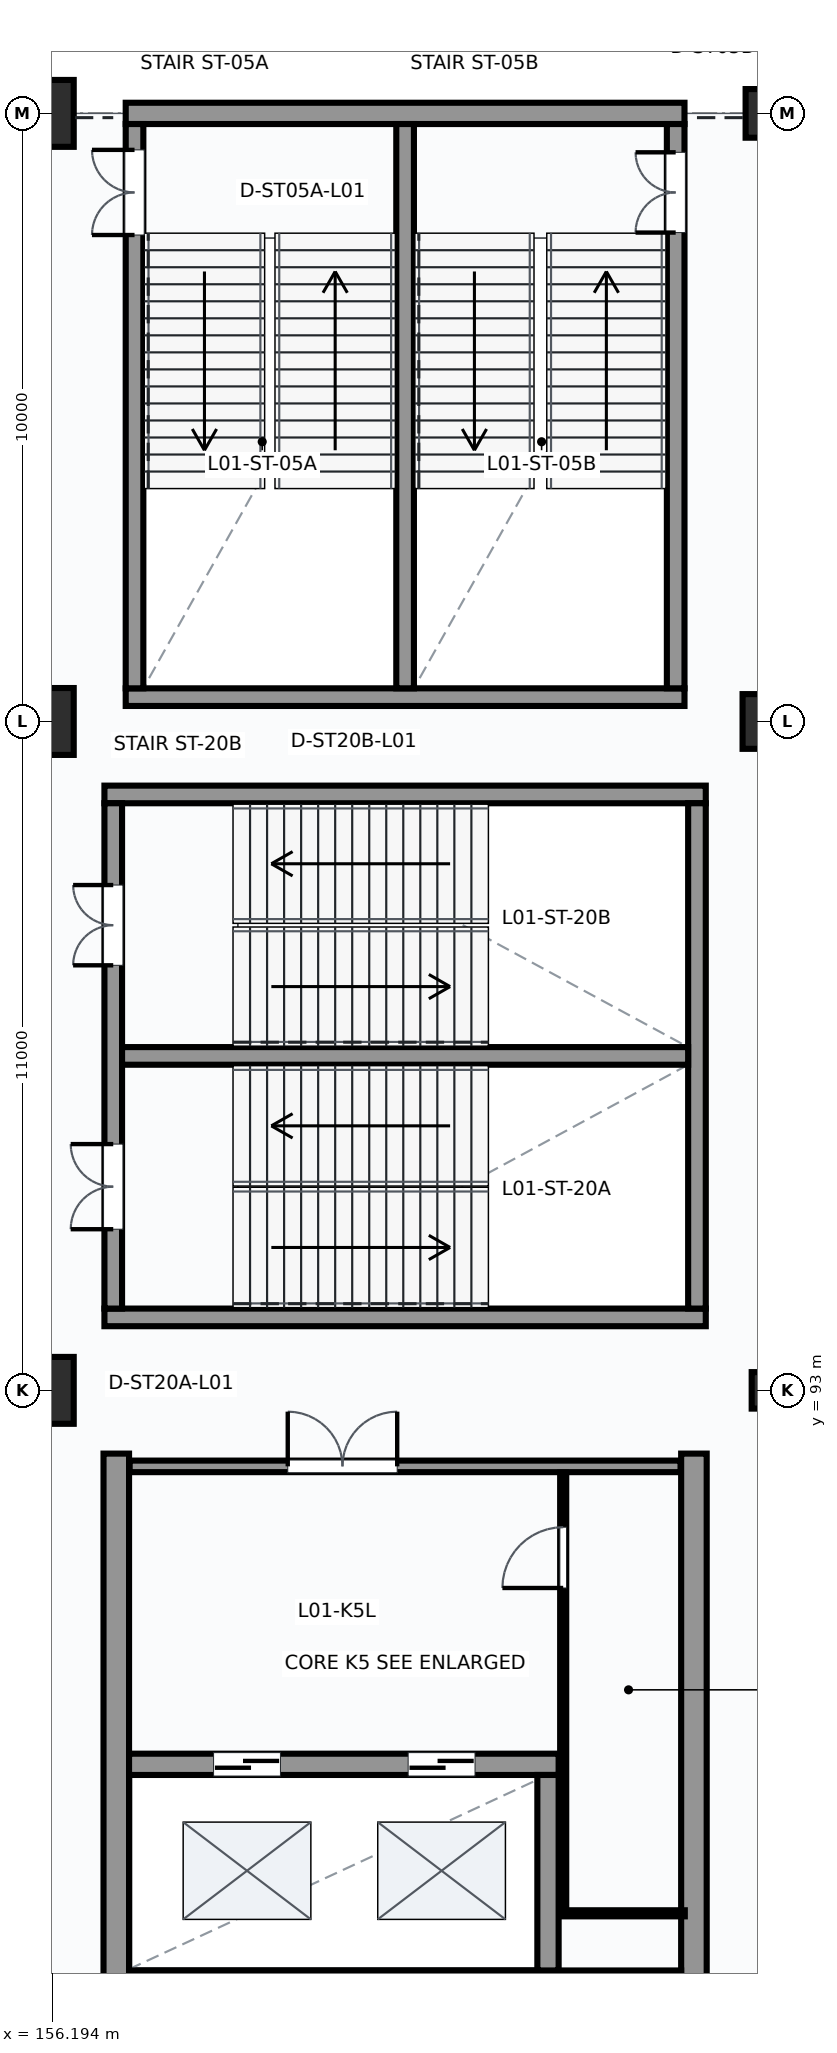
"""IFC4 building model, lengths in metres.
Left out: names, types, materials, properties, quantities, classifications, styles, units other than length and angle.
Written with IfcOpenShell. Run it as: python <this file> out.ifc"""

import sys

from ifc_helpers import new_model, si_unit, direction, frame, frame_2d, origin, origin_2d, place, context, subcontext, project, spatial, rectangle, circle, extrude, element, fill, save


model = new_model("IFC4")
c1 = context("Model", 3, precision=1e-05, world=origin(), true_north=direction((0.0, 1.0)))
c2 = subcontext(c1, "Body", "Model", "MODEL_VIEW")
j1 = project(units=[si_unit("LENGTHUNIT", "METRE"), si_unit("PLANEANGLEUNIT", "RADIAN")], contexts=[c1])
p1 = place(None, origin())
s1 = spatial("IfcSite", under=j1, at=p1, CompositionType="ELEMENT")
p2 = place(p1, origin())
s2 = spatial("IfcBuilding", under=s1, at=p2, CompositionType="ELEMENT")
p3 = place(p2, frame((0.0, 0.0, 5.4)))
s3 = spatial("IfcBuildingStorey", under=s2, at=p3, CompositionType="ELEMENT", Elevation=5.4)
for number, where, z_axis, x_axis in (
    (1, (156.0, 93.0, 0.0), (0.0, 0.0, 1.0), (1.0, 0.0, 0.0)),
    (2, (156.0, 104.0, 0.0), (0.0, 0.0, 1.0), (1.0, 0.0, 0.0)),
    (3, (156.0, 114.0, 0.0), (0.0, 0.0, 1.0), (1.0, 0.0, 0.0)),
):
    element("IfcColumn", number, at=place(p3, frame(where, z_axis=z_axis, x_axis=x_axis)), inside=s3, PredefinedType="COLUMN", context=c2, shape_type="SweptSolid", body=[
        extrude(rectangle(XDim=1.1, YDim=1.1, at=origin_2d()), origin(), (0.0, 0.0, 1.0), 4.8),
    ])
p4 = place(p3, frame((168.0, 93.0, 0.0), z_axis=(0.0, 0.0, 1.0), x_axis=(1.0, 0.0, 0.0)))
e4 = element("IfcColumn", 4, at=p4, inside=s3, PredefinedType="COLUMN", context=c2, shape_type="SweptSolid", body=[
    extrude(rectangle(XDim=0.6, YDim=0.6, at=origin_2d()), origin(), (0.0, 0.0, 1.0), 4.8),
])
p5 = place(p3, frame((168.0, 104.0, 0.0), z_axis=(0.0, 0.0, 1.0), x_axis=(1.0, 0.0, 0.0)))
e5 = element("IfcColumn", 5, at=p5, inside=s3, PredefinedType="COLUMN", context=c2, shape_type="SweptSolid", body=[
    extrude(circle(Radius=0.45, at=origin_2d()), origin(), (0.0, 0.0, 1.0), 4.8),
])
p6 = place(p3, frame((168.0, 114.0, 0.0), z_axis=(0.0, 0.0, 1.0), x_axis=(1.0, 0.0, 0.0)))
e6 = element("IfcColumn", 6, at=p6, inside=s3, PredefinedType="COLUMN", context=c2, shape_type="SweptSolid", body=[
    extrude(circle(Radius=0.4, at=origin_2d()), origin(), (0.0, 0.0, 1.0), 4.8),
])
p7 = place(p3, frame((157.405, 104.4, 0.0), z_axis=(0.0, 0.0, 1.0), x_axis=(1.0, 0.0, 0.0)))
e7 = element("IfcWall", 7, at=p7, inside=s3, PredefinedType="SHEAR", context=c2, shape_type="SweptSolid", body=[
    extrude(rectangle(XDim=9.19, YDim=0.29, at=frame_2d((4.595, 0.0))), origin(), (0.0, 0.0, 1.0), 4.8),
])
p8 = place(p3, frame((157.405, 114.0, 0.0), z_axis=(0.0, 0.0, 1.0), x_axis=(1.0, 0.0, 0.0)))
e8 = element("IfcWall", 8, at=p8, inside=s3, PredefinedType="SHEAR", context=c2, shape_type="SweptSolid", body=[
    extrude(rectangle(XDim=9.19, YDim=0.35, at=frame_2d((4.595, 0.0))), origin(), (0.0, 0.0, 1.0), 3.757),
])
p9 = place(p3, frame((157.55, 104.545, 0.0), z_axis=(0.0, 0.0, 1.0), x_axis=(0.0, 1.0, 0.0)))
e9 = element("IfcWall", 9, at=p9, inside=s3, PredefinedType="SHEAR", context=c2, shape_type="SweptSolid", body=[
    extrude(rectangle(XDim=9.28, YDim=0.29, at=frame_2d((4.64, 0.0))), origin(), (0.0, 0.0, 1.0), 4.8),
])
p10 = place(p9, frame((7.455, 0.0, 0.0)))
e10 = element("IfcOpeningElement", 10, at=p10, cuts=e9, PredefinedType="OPENING", context=c2, shape_type="SweptSolid", body=[
    extrude(rectangle(XDim=1.4, YDim=2.2, at=frame_2d((0.7, 1.1))), frame((0.0, 0.155, 0.0), z_axis=(0.0, -1.0, 0.0), x_axis=(1.0, 0.0, 0.0)), (0.0, 0.0, 1.0), 0.31),
])
p11 = place(p3, frame((166.45, 104.545, 0.0), z_axis=(0.0, 0.0, 1.0), x_axis=(0.0, 1.0, 0.0)))
e11 = element("IfcWall", 11, at=p11, inside=s3, PredefinedType="SHEAR", context=c2, shape_type="SweptSolid", body=[
    extrude(rectangle(XDim=9.28, YDim=0.29, at=frame_2d((4.64, 0.0))), origin(), (0.0, 0.0, 1.0), 4.8),
])
p12 = place(p11, frame((7.495, 0.0, 0.0)))
e12 = element("IfcOpeningElement", 12, at=p12, cuts=e11, PredefinedType="OPENING", context=c2, shape_type="SweptSolid", body=[
    extrude(rectangle(XDim=1.32, YDim=2.2, at=frame_2d((0.66, 1.1))), frame((0.0, 0.155, 0.0), z_axis=(0.0, -1.0, 0.0), x_axis=(1.0, 0.0, 0.0)), (0.0, 0.0, 1.0), 0.31),
])
p13 = place(p3, frame((162.0, 104.545, 0.0), z_axis=(0.0, 0.0, 1.0), x_axis=(0.0, 1.0, 0.0)))
e13 = element("IfcWall", 13, at=p13, inside=s3, PredefinedType="SHEAR", context=c2, shape_type="SweptSolid", body=[
    extrude(rectangle(XDim=9.28, YDim=0.29, at=frame_2d((4.64, 0.0))), origin(), (0.0, 0.0, 1.0), 4.8),
])
for number, where, z_axis, x_axis in (
    (14, (157.055, 94.2, 0.0), (0.0, 0.0, 1.0), (1.0, 0.0, 0.0)),
    (15, (157.055, 102.8, 0.0), (0.0, 0.0, 1.0), (1.0, 0.0, 0.0)),
):
    element("IfcWall", number, at=place(p3, frame(where, z_axis=z_axis, x_axis=x_axis)), inside=s3, PredefinedType="SHEAR", context=c2, shape_type="SweptSolid", body=[
        extrude(rectangle(XDim=9.89, YDim=0.29, at=frame_2d((4.945, 0.0))), origin(), (0.0, 0.0, 1.0), 4.8),
    ])
p14 = place(p3, frame((157.2, 94.345, 0.0), z_axis=(0.0, 0.0, 1.0), x_axis=(0.0, 1.0, 0.0)))
e16 = element("IfcWall", 16, at=p14, inside=s3, PredefinedType="SHEAR", context=c2, shape_type="SweptSolid", body=[
    extrude(rectangle(XDim=8.31, YDim=0.29, at=frame_2d((4.155, 0.0))), origin(), (0.0, 0.0, 1.0), 4.8),
])
p15 = place(p14, frame((1.305, 0.0, 0.0)))
e17 = element("IfcOpeningElement", 17, at=p15, cuts=e16, PredefinedType="OPENING", context=c2, shape_type="SweptSolid", body=[
    extrude(rectangle(XDim=1.4, YDim=2.2, at=frame_2d((0.7, 1.1))), frame((0.0, 0.155, 0.0), z_axis=(0.0, -1.0, 0.0), x_axis=(1.0, 0.0, 0.0)), (0.0, 0.0, 1.0), 0.31),
])
p16 = place(p14, frame((5.645, 0.0, 0.0)))
e18 = element("IfcOpeningElement", 18, at=p16, cuts=e16, PredefinedType="OPENING", context=c2, shape_type="SweptSolid", body=[
    extrude(rectangle(XDim=1.32, YDim=2.2, at=frame_2d((0.66, 1.1))), frame((0.0, 0.155, 0.0), z_axis=(0.0, -1.0, 0.0), x_axis=(1.0, 0.0, 0.0)), (0.0, 0.0, 1.0), 0.31),
])
p17 = place(p3, frame((166.8, 94.345, 0.0), z_axis=(0.0, 0.0, 1.0), x_axis=(0.0, 1.0, 0.0)))
e19 = element("IfcWall", 19, at=p17, inside=s3, PredefinedType="SHEAR", context=c2, shape_type="SweptSolid", body=[
    extrude(rectangle(XDim=8.31, YDim=0.29, at=frame_2d((4.155, 0.0))), origin(), (0.0, 0.0, 1.0), 4.8),
])
p18 = place(p3, frame((157.345, 98.5, 0.0), z_axis=(0.0, 0.0, 1.0), x_axis=(1.0, 0.0, 0.0)))
e20 = element("IfcWall", 20, at=p18, inside=s3, PredefinedType="SHEAR", context=c2, shape_type="SweptSolid", body=[
    extrude(rectangle(XDim=9.31, YDim=0.29, at=frame_2d((4.655, 0.0))), origin(), (0.0, 0.0, 1.0), 4.8),
])
for number, where, z_axis, x_axis in (
    (21, (157.25, 83.04, 0.0), (0.0, 0.0, 1.0), (0.0, 1.0, 0.0)),
    (22, (166.75, 83.04, 0.0), (0.0, 0.0, 1.0), (0.0, 1.0, 0.0)),
):
    element("IfcWall", number, at=place(p3, frame(where, z_axis=z_axis, x_axis=x_axis)), inside=s3, PredefinedType="SHEAR", context=c2, shape_type="SweptSolid", body=[
        extrude(rectangle(XDim=8.92, YDim=0.42, at=frame_2d((4.46, 0.0))), origin(), (0.0, 0.0, 1.0), 4.8),
    ])
p19 = place(p3, frame((157.46, 83.25, 0.0), z_axis=(0.0, 0.0, 1.0), x_axis=(1.0, 0.0, 0.0)))
e23 = element("IfcWall", 23, at=p19, inside=s3, PredefinedType="SHEAR", context=c2, shape_type="SweptSolid", body=[
    extrude(rectangle(XDim=9.08, YDim=0.42, at=frame_2d((4.54, 0.0))), origin(), (0.0, 0.0, 1.0), 4.8),
])
p20 = place(p3, frame((157.46, 86.85, 0.0), z_axis=(0.0, 0.0, 1.0), x_axis=(1.0, 0.0, 0.0)))
e24 = element("IfcWall", 24, at=p20, inside=s3, PredefinedType="SHEAR", context=c2, shape_type="SweptSolid", body=[
    extrude(rectangle(XDim=7.065, YDim=0.35, at=frame_2d((3.532, 0.0))), origin(), (0.0, 0.0, 1.0), 4.8),
])
p21 = place(p20, frame((1.39, 0.0, 0.0)))
e25 = element("IfcOpeningElement", 25, at=p21, cuts=e24, PredefinedType="OPENING", context=c2, shape_type="SweptSolid", body=[
    extrude(rectangle(XDim=1.1, YDim=2.2, at=frame_2d((0.55, 1.1))), frame((0.0, 0.185, 0.0), z_axis=(0.0, -1.0, 0.0), x_axis=(1.0, 0.0, 0.0)), (0.0, 0.0, 1.0), 0.37),
])
p22 = place(p20, frame((4.59, 0.0, 0.0)))
e26 = element("IfcOpeningElement", 26, at=p22, cuts=e24, PredefinedType="OPENING", context=c2, shape_type="SweptSolid", body=[
    extrude(rectangle(XDim=1.1, YDim=2.2, at=frame_2d((0.55, 1.1))), frame((0.0, 0.185, 0.0), z_axis=(0.0, -1.0, 0.0), x_axis=(1.0, 0.0, 0.0)), (0.0, 0.0, 1.0), 0.37),
])
p23 = place(p3, frame((164.35, 83.46, 0.0), z_axis=(0.0, 0.0, 1.0), x_axis=(0.0, 1.0, 0.0)))
e27 = element("IfcWall", 27, at=p23, inside=s3, PredefinedType="SHEAR", context=c2, shape_type="SweptSolid", body=[
    extrude(rectangle(XDim=3.215, YDim=0.35, at=frame_2d((1.607, 0.0))), origin(), (0.0, 0.0, 1.0), 4.8),
])
p24 = place(p3, frame((157.47, 91.75, 0.0), z_axis=(0.0, 0.0, 1.0), x_axis=(1.0, 0.0, 0.0)))
e28 = element("IfcWall", 28, at=p24, inside=s3, PredefinedType="PARTITIONING", context=c2, shape_type="SweptSolid", body=[
    extrude(rectangle(XDim=9.06, YDim=0.19, at=frame_2d((4.53, 0.0))), origin(), (0.0, 0.0, 1.0), 4.47),
])
p25 = place(p24, frame((2.6, 0.0, 0.0)))
e29 = element("IfcOpeningElement", 29, at=p25, cuts=e28, PredefinedType="OPENING", context=c2, shape_type="SweptSolid", body=[
    extrude(rectangle(XDim=1.8, YDim=2.3, at=frame_2d((0.9, 1.15))), frame((0.0, 0.105, 0.0), z_axis=(0.0, -1.0, 0.0), x_axis=(1.0, 0.0, 0.0)), (0.0, 0.0, 1.0), 0.21),
])
p26 = place(p3, frame((164.6, 84.4, 0.0), z_axis=(0.0, 0.0, 1.0), x_axis=(0.0, 1.0, 0.0)))
e30 = element("IfcWall", 30, at=p26, inside=s3, PredefinedType="PARTITIONING", context=c2, shape_type="SweptSolid", body=[
    extrude(rectangle(XDim=7.25, YDim=0.1, at=frame_2d((3.625, 0.0))), origin(), (0.0, 0.0, 1.0), 4.47),
])
p27 = place(p26, frame((5.35, 0.0, 0.0)))
e31 = element("IfcOpeningElement", 31, at=p27, cuts=e30, PredefinedType="OPENING", context=c2, shape_type="SweptSolid", body=[
    extrude(rectangle(XDim=1.0, YDim=2.1, at=frame_2d((0.5, 1.05))), frame((0.0, 0.06, 0.0), z_axis=(0.0, -1.0, 0.0), x_axis=(1.0, 0.0, 0.0)), (0.0, 0.0, 1.0), 0.12),
])
p28 = place(p3, frame((164.6, 84.4, 0.0), z_axis=(0.0, 0.0, 1.0), x_axis=(1.0, 0.0, 0.0)))
e32 = element("IfcWall", 32, at=p28, inside=s3, PredefinedType="PARTITIONING", context=c2, shape_type="SweptSolid", body=[
    extrude(rectangle(XDim=2.0, YDim=0.1, at=frame_2d((1.0, 0.0))), origin(), (0.0, 0.0, 1.0), 4.47),
])
p29 = place(p10, frame((1.4, 0.0, 0.0), z_axis=(0.0, 0.0, 1.0), x_axis=(-1.0, 0.0, 0.0)))
e33 = element("IfcDoor", 33, at=p29, inside=s3, OperationType="DOUBLE_DOOR_SINGLE_SWING", PredefinedType="DOOR", context=c2, shape_type="SweptSolid", body=[
    extrude(rectangle(XDim=1.4, YDim=2.2, at=frame_2d((0.7, 1.1))), frame((0.0, 0.025, 0.0), z_axis=(0.0, -1.0, 0.0), x_axis=(1.0, 0.0, 0.0)), (0.0, 0.0, 1.0), 0.05),
])
fill(e10, e33)
p30 = place(p12, origin())
e34 = element("IfcDoor", 34, at=p30, inside=s3, OperationType="DOUBLE_DOOR_SINGLE_SWING", PredefinedType="DOOR", context=c2, shape_type="SweptSolid", body=[
    extrude(rectangle(XDim=1.32, YDim=2.2, at=frame_2d((0.66, 1.1))), frame((0.0, 0.025, 0.0), z_axis=(0.0, -1.0, 0.0), x_axis=(1.0, 0.0, 0.0)), (0.0, 0.0, 1.0), 0.05),
])
fill(e12, e34)
p31 = place(p15, origin())
e35 = element("IfcDoor", 35, at=p31, inside=s3, OperationType="DOUBLE_DOOR_SINGLE_SWING", PredefinedType="DOOR", context=c2, shape_type="SweptSolid", body=[
    extrude(rectangle(XDim=1.4, YDim=2.2, at=frame_2d((0.7, 1.1))), frame((0.0, 0.025, 0.0), z_axis=(0.0, -1.0, 0.0), x_axis=(1.0, 0.0, 0.0)), (0.0, 0.0, 1.0), 0.05),
])
fill(e17, e35)
p32 = place(p16, origin())
e36 = element("IfcDoor", 36, at=p32, inside=s3, OperationType="DOUBLE_DOOR_SINGLE_SWING", PredefinedType="DOOR", context=c2, shape_type="SweptSolid", body=[
    extrude(rectangle(XDim=1.32, YDim=2.2, at=frame_2d((0.66, 1.1))), frame((0.0, 0.025, 0.0), z_axis=(0.0, -1.0, 0.0), x_axis=(1.0, 0.0, 0.0)), (0.0, 0.0, 1.0), 0.05),
])
fill(e18, e36)
p33 = place(p21, origin())
e37 = element("IfcDoor", 37, at=p33, inside=s3, OperationType="SLIDING_TO_LEFT", PredefinedType="DOOR", context=c2, shape_type="SweptSolid", body=[
    extrude(rectangle(XDim=1.1, YDim=2.2, at=frame_2d((0.55, 1.1))), frame((0.0, 0.025, 0.0), z_axis=(0.0, -1.0, 0.0), x_axis=(1.0, 0.0, 0.0)), (0.0, 0.0, 1.0), 0.05),
])
fill(e25, e37)
p34 = place(p22, origin())
e38 = element("IfcDoor", 38, at=p34, inside=s3, OperationType="SLIDING_TO_LEFT", PredefinedType="DOOR", context=c2, shape_type="SweptSolid", body=[
    extrude(rectangle(XDim=1.1, YDim=2.2, at=frame_2d((0.55, 1.1))), frame((0.0, 0.025, 0.0), z_axis=(0.0, -1.0, 0.0), x_axis=(1.0, 0.0, 0.0)), (0.0, 0.0, 1.0), 0.05),
])
fill(e26, e38)
p35 = place(p25, origin())
e39 = element("IfcDoor", 39, at=p35, inside=s3, OperationType="DOUBLE_DOOR_SINGLE_SWING", PredefinedType="DOOR", context=c2, shape_type="SweptSolid", body=[
    extrude(rectangle(XDim=1.8, YDim=2.3, at=frame_2d((0.9, 1.15))), frame((0.0, 0.025, 0.0), z_axis=(0.0, -1.0, 0.0), x_axis=(1.0, 0.0, 0.0)), (0.0, 0.0, 1.0), 0.05),
])
fill(e29, e39)
p36 = place(p27, origin())
e40 = element("IfcDoor", 40, at=p36, inside=s3, OperationType="SINGLE_SWING_LEFT", PredefinedType="DOOR", context=c2, shape_type="SweptSolid", body=[
    extrude(rectangle(XDim=1.0, YDim=2.1, at=frame_2d((0.5, 1.05))), frame((0.0, 0.025, 0.0), z_axis=(0.0, -1.0, 0.0), x_axis=(1.0, 0.0, 0.0)), (0.0, 0.0, 1.0), 0.05),
])
fill(e31, e40)
save(model, sys.argv[1])
